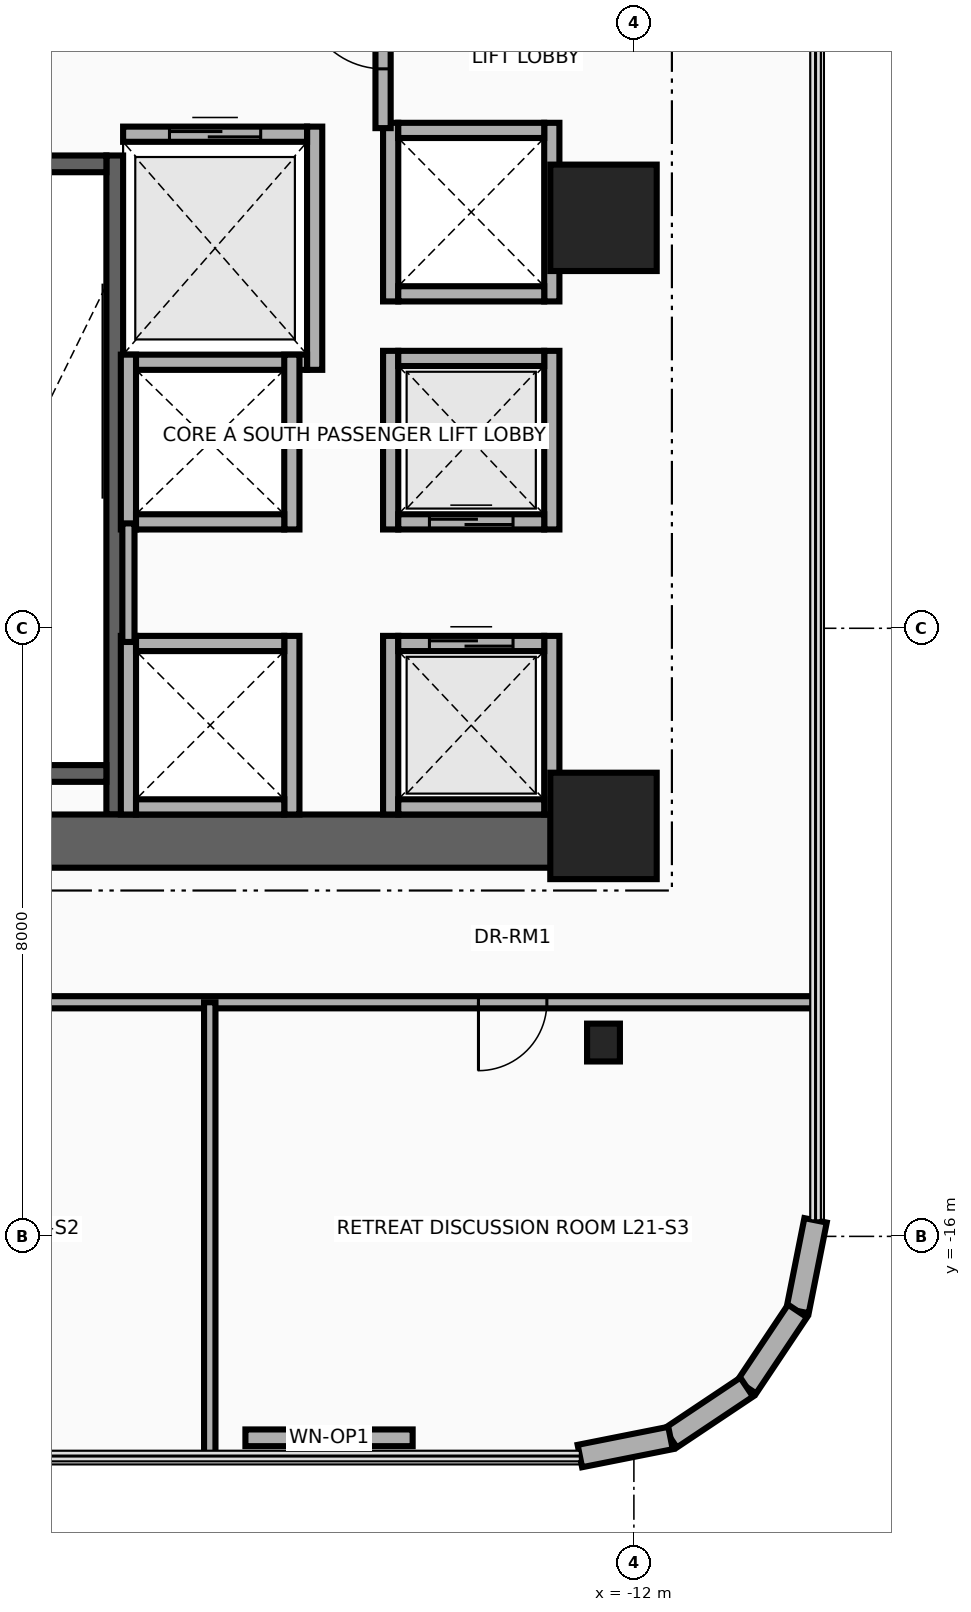
"""IFC4 building model, lengths in metres.
Left out: names, types, materials, properties, quantities, classifications, styles, units other than length and angle.
Written with IfcOpenShell. Run it as: python <this file> out.ifc"""

import sys

from ifc_helpers import new_model, si_unit, direction, frame, frame_2d, origin, origin_2d, place, context, subcontext, project, spatial, rectangle, i_section, extrude, source, transform, mapped, element, fill, save


model = new_model("IFC4")
c1 = context("Model", 3, precision=1e-05, world=origin(), true_north=direction((0.0, 1.0)))
c2 = subcontext(c1, "Body", "Model", "MODEL_VIEW")
j1 = project(units=[si_unit("LENGTHUNIT", "METRE"), si_unit("PLANEANGLEUNIT", "RADIAN")], contexts=[c1])
p1 = place(None, origin())
s1 = spatial("IfcSite", under=j1, at=p1, CompositionType="ELEMENT")
p2 = place(p1, origin())
s2 = spatial("IfcBuilding", under=s1, at=p2, CompositionType="ELEMENT")
p3 = place(p2, frame((0.0, 0.0, 85.2)))
s3 = spatial("IfcBuildingStorey", under=s2, at=p3, CompositionType="ELEMENT", Elevation=85.2)
p4 = place(p3, frame((-18.83, -10.45, 0.0), z_axis=(0.0, 0.0, 1.0), x_axis=(0.0, 1.0, 0.0)))
e1 = element("IfcWall", 1, at=p4, inside=s3, PredefinedType="SHEAR", context=c2, shape_type="SweptSolid", body=[
    extrude(rectangle(XDim=8.67, YDim=0.22, at=frame_2d((4.335, 0.0))), origin(), (0.0, 0.0, 1.0), 3.46),
])
p5 = place(p3, frame((-22.05, -9.91, 0.0), z_axis=(0.0, 0.0, 1.0), x_axis=(1.0, 0.0, 0.0)))
e2 = element("IfcWall", 2, at=p5, inside=s3, PredefinedType="SHEAR", context=c2, shape_type="SweptSolid", body=[
    extrude(rectangle(XDim=3.11, YDim=0.22, at=frame_2d((1.555, 0.0))), origin(), (0.0, 0.0, 1.0), 3.46),
])
p6 = place(p3, frame((-22.05, -1.89, 0.0), z_axis=(0.0, 0.0, 1.0), x_axis=(1.0, 0.0, 0.0)))
e3 = element("IfcWall", 3, at=p6, inside=s3, PredefinedType="SHEAR", context=c2, shape_type="SweptSolid", body=[
    extrude(rectangle(XDim=3.11, YDim=0.22, at=frame_2d((1.555, 0.0))), origin(), (0.0, 0.0, 1.0), 3.46),
])
p7 = place(p6, frame((1.0, 0.0, 0.0)))
e4 = element("IfcOpeningElement", 4, at=p7, cuts=e3, PredefinedType="OPENING", context=c2, shape_type="SweptSolid", body=[
    extrude(rectangle(XDim=1.1, YDim=2.15, at=frame_2d((0.55, 1.075))), frame((0.0, 0.125, 0.0), z_axis=(0.0, -1.0, 0.0), x_axis=(1.0, 0.0, 0.0)), (0.0, 0.0, 1.0), 0.25),
])
p8 = place(p3, frame((-22.65, -10.8, 0.0), z_axis=(0.0, 0.0, 1.0), x_axis=(1.0, 0.0, 0.0)))
e5 = element("IfcWall", 5, at=p8, inside=s3, PredefinedType="SHEAR", context=c2, shape_type="SweptSolid", body=[
    extrude(rectangle(XDim=10.25, YDim=0.7, at=frame_2d((5.125, 0.0))), origin(), (0.0, 0.0, 1.0), 3.46),
])
m1 = source(origin(), c2, "Body", "SweptSolid", [
    extrude(rectangle(XDim=1.4, YDim=1.4, at=origin_2d()), origin(), (0.0, 0.0, 1.0), 3.7),
])
for number, where, z_axis, x_axis in (
    (6, (-12.4, -10.6, 0.0), (0.0, 0.0, 1.0), (1.0, 0.0, 0.0)),
    (7, (-12.4, -2.6, 0.0), (0.0, 0.0, 1.0), (1.0, 0.0, 0.0)),
):
    element("IfcColumn", number, at=place(p3, frame(where, z_axis=z_axis, x_axis=x_axis)), inside=s3, PredefinedType="COLUMN", context=c2, shape_type="MappedRepresentation", body=[
        mapped(m1, transform((0.0, 0.0, 0.0), x_axis=(1.0, 0.0, 0.0), y_axis=(0.0, 1.0, 0.0), z_axis=(0.0, 0.0, 1.0), scale=1.0)),
    ])
m2 = source(origin(), c2, "Body", "SweptSolid", [
    extrude(i_section(OverallWidth=0.432, OverallDepth=0.498, WebThickness=0.056, FlangeThickness=0.089, at=origin_2d()), origin(), (0.0, 0.0, 1.0), 3.7),
])
p9 = place(p3, frame((-12.4, -13.45, 0.0), z_axis=(0.0, 0.0, 1.0), x_axis=(1.0, 0.0, 0.0)))
e8 = element("IfcColumn", 8, at=p9, inside=s3, PredefinedType="COLUMN", context=c2, shape_type="MappedRepresentation", body=[
    mapped(m2, transform((0.0, 0.0, 0.0), x_axis=(1.0, 0.0, 0.0), y_axis=(0.0, 1.0, 0.0), z_axis=(0.0, 0.0, 1.0), scale=1.0)),
])
p10 = place(p3, frame((-9.61, -15.789, 0.0), z_axis=(0.0, 0.0, 1.0), x_axis=(-0.194996050505, -0.980804027463, 0.0)))
e9 = element("IfcWall", 9, at=p10, inside=s3, PredefinedType="SOLIDWALL", context=c2, shape_type="SweptSolid", body=[
    extrude(rectangle(XDim=1.216, YDim=0.3, at=frame_2d((0.608, 0.0))), origin(), (0.0, 0.0, 1.0), 3.46),
])
for number, where, z_axis, x_axis in (
    (10, (-9.847, -16.982, 0.0), (0.0, 0.0, 1.0), (-0.556, -0.831, 0.0)),
    (11, (-10.517, -17.983, 0.0), (0.0, 0.0, 1.0), (-0.831, -0.556, 0.0)),
):
    element("IfcWall", number, at=place(p3, frame(where, z_axis=z_axis, x_axis=x_axis)), inside=s3, PredefinedType="SOLIDWALL", context=c2, shape_type="SweptSolid", body=[
        extrude(rectangle(XDim=1.205, YDim=0.3, at=frame_2d((0.603, 0.0))), origin(), (0.0, 0.0, 1.0), 3.46),
    ])
p11 = place(p3, frame((-11.518, -18.653, 0.0), z_axis=(0.0, 0.0, 1.0), x_axis=(-0.980804027463, -0.194996050505, 0.0)))
e12 = element("IfcWall", 12, at=p11, inside=s3, PredefinedType="SOLIDWALL", context=c2, shape_type="SweptSolid", body=[
    extrude(rectangle(XDim=1.216, YDim=0.3, at=frame_2d((0.608, 0.0))), origin(), (0.0, 0.0, 1.0), 3.46),
])
p12 = place(p3, frame((-14.911, -18.65, 0.0), z_axis=(0.0, 0.0, 1.0), x_axis=(-1.0, 0.0, 0.0)))
e13 = element("IfcWall", 13, at=p12, inside=s3, PredefinedType="SOLIDWALL", context=c2, shape_type="SweptSolid", body=[
    extrude(rectangle(XDim=2.2, YDim=0.22, at=frame_2d((1.1, 0.0))), origin(), (0.0, 0.0, 1.0), 3.46),
])
p13 = place(p12, frame((0.65, 0.0, 0.95)))
e14 = element("IfcOpeningElement", 14, at=p13, cuts=e13, PredefinedType="OPENING", context=c2, shape_type="SweptSolid", body=[
    extrude(rectangle(XDim=0.9, YDim=1.3, at=frame_2d((0.45, 0.65))), frame((0.0, 0.125, 0.0), z_axis=(0.0, -1.0, 0.0), x_axis=(1.0, 0.0, 0.0)), (0.0, 0.0, 1.0), 0.25),
])
p14 = place(p3, frame((-16.2, -4.6, 0.0), z_axis=(0.0, 0.0, 1.0), x_axis=(0.0, 1.0, 0.0)))
e15 = element("IfcWall", 15, at=p14, inside=s3, PredefinedType="MOVABLE", context=c2, shape_type="SweptSolid", body=[
    extrude(rectangle(XDim=3.2, YDim=0.2, at=frame_2d((1.6, 0.0))), origin(), (0.0, 0.0, 1.0), 3.46),
])
p15 = place(p3, frame((-18.72, -4.5, 0.0), z_axis=(0.0, 0.0, 1.0), x_axis=(1.0, 0.0, 0.0)))
e16 = element("IfcWall", 16, at=p15, inside=s3, PredefinedType="MOVABLE", context=c2, shape_type="SweptSolid", body=[
    extrude(rectangle(XDim=2.42, YDim=0.2, at=frame_2d((1.21, 0.0))), origin(), (0.0, 0.0, 1.0), 3.46),
])
p16 = place(p3, frame((-18.72, -1.5, 0.0), z_axis=(0.0, 0.0, 1.0), x_axis=(1.0, 0.0, 0.0)))
e17 = element("IfcWall", 17, at=p16, inside=s3, PredefinedType="MOVABLE", context=c2, shape_type="SweptSolid", body=[
    extrude(rectangle(XDim=2.42, YDim=0.2, at=frame_2d((1.21, 0.0))), origin(), (0.0, 0.0, 1.0), 3.46),
])
p17 = place(p16, frame((0.61, 0.0, 0.0)))
e18 = element("IfcOpeningElement", 18, at=p17, cuts=e17, PredefinedType="OPENING", context=c2, shape_type="SweptSolid", body=[
    extrude(rectangle(XDim=1.2, YDim=2.1, at=frame_2d((0.6, 1.05))), frame((0.0, 0.115, 0.0), z_axis=(0.0, -1.0, 0.0), x_axis=(1.0, 0.0, 0.0)), (0.0, 0.0, 1.0), 0.23),
])
for number, where, z_axis, x_axis in (
    (19, (-15.2, -10.45, 0.0), (0.0, 0.0, 1.0), (0.0, 1.0, 0.0)),
    (20, (-13.08, -10.45, 0.0), (0.0, 0.0, 1.0), (0.0, 1.0, 0.0)),
):
    element("IfcWall", number, at=place(p3, frame(where, z_axis=z_axis, x_axis=x_axis)), inside=s3, PredefinedType="MOVABLE", context=c2, shape_type="SweptSolid", body=[
        extrude(rectangle(XDim=2.35, YDim=0.2, at=frame_2d((1.175, 0.0))), origin(), (0.0, 0.0, 1.0), 2.583),
    ])
p18 = place(p3, frame((-15.1, -10.35, 0.0), z_axis=(0.0, 0.0, 1.0), x_axis=(1.0, 0.0, 0.0)))
e21 = element("IfcWall", 21, at=p18, inside=s3, PredefinedType="MOVABLE", context=c2, shape_type="SweptSolid", body=[
    extrude(rectangle(XDim=1.92, YDim=0.2, at=frame_2d((0.96, 0.0))), origin(), (0.0, 0.0, 1.0), 2.583),
])
p19 = place(p3, frame((-15.1, -8.2, 0.0), z_axis=(0.0, 0.0, 1.0), x_axis=(1.0, 0.0, 0.0)))
e22 = element("IfcWall", 22, at=p19, inside=s3, PredefinedType="MOVABLE", context=c2, shape_type="SweptSolid", body=[
    extrude(rectangle(XDim=1.92, YDim=0.2, at=frame_2d((0.96, 0.0))), origin(), (0.0, 0.0, 1.0), 3.46),
])
p20 = place(p19, frame((0.41, 0.0, 0.0)))
e23 = element("IfcOpeningElement", 23, at=p20, cuts=e22, PredefinedType="OPENING", context=c2, shape_type="SweptSolid", body=[
    extrude(rectangle(XDim=1.1, YDim=2.1, at=frame_2d((0.55, 1.05))), frame((0.0, 0.115, 0.0), z_axis=(0.0, -1.0, 0.0), x_axis=(1.0, 0.0, 0.0)), (0.0, 0.0, 1.0), 0.23),
])
for number, where, z_axis, x_axis in (
    (24, (-15.2, -6.7, 0.0), (0.0, 0.0, 1.0), (0.0, 1.0, 0.0)),
    (25, (-13.08, -6.7, 0.0), (0.0, 0.0, 1.0), (0.0, 1.0, 0.0)),
):
    element("IfcWall", number, at=place(p3, frame(where, z_axis=z_axis, x_axis=x_axis)), inside=s3, PredefinedType="MOVABLE", context=c2, shape_type="SweptSolid", body=[
        extrude(rectangle(XDim=2.35, YDim=0.2, at=frame_2d((1.175, 0.0))), origin(), (0.0, 0.0, 1.0), 3.46),
    ])
p21 = place(p3, frame((-15.1, -6.6, 0.0), z_axis=(0.0, 0.0, 1.0), x_axis=(1.0, 0.0, 0.0)))
e26 = element("IfcWall", 26, at=p21, inside=s3, PredefinedType="MOVABLE", context=c2, shape_type="SweptSolid", body=[
    extrude(rectangle(XDim=1.92, YDim=0.2, at=frame_2d((0.96, 0.0))), origin(), (0.0, 0.0, 1.0), 3.46),
])
p22 = place(p21, frame((0.41, 0.0, 0.0)))
e27 = element("IfcOpeningElement", 27, at=p22, cuts=e26, PredefinedType="OPENING", context=c2, shape_type="SweptSolid", body=[
    extrude(rectangle(XDim=1.1, YDim=2.1, at=frame_2d((0.55, 1.05))), frame((0.0, 0.115, 0.0), z_axis=(0.0, -1.0, 0.0), x_axis=(1.0, 0.0, 0.0)), (0.0, 0.0, 1.0), 0.23),
])
p23 = place(p3, frame((-15.1, -4.45, 0.0), z_axis=(0.0, 0.0, 1.0), x_axis=(1.0, 0.0, 0.0)))
e28 = element("IfcWall", 28, at=p23, inside=s3, PredefinedType="MOVABLE", context=c2, shape_type="SweptSolid", body=[
    extrude(rectangle(XDim=1.92, YDim=0.2, at=frame_2d((0.96, 0.0))), origin(), (0.0, 0.0, 1.0), 3.46),
])
for number, where, z_axis, x_axis in (
    (29, (-18.65, -10.45, 0.0), (0.0, 0.0, 1.0), (0.0, 1.0, 0.0)),
    (30, (-16.5, -10.45, 0.0), (0.0, 0.0, 1.0), (0.0, 1.0, 0.0)),
):
    element("IfcWall", number, at=place(p3, frame(where, z_axis=z_axis, x_axis=x_axis)), inside=s3, PredefinedType="MOVABLE", context=c2, shape_type="SweptSolid", body=[
        extrude(rectangle(XDim=2.35, YDim=0.2, at=frame_2d((1.175, 0.0))), origin(), (0.0, 0.0, 1.0), 2.583),
    ])
p24 = place(p3, frame((-18.55, -10.35, 0.0), z_axis=(0.0, 0.0, 1.0), x_axis=(1.0, 0.0, 0.0)))
e31 = element("IfcWall", 31, at=p24, inside=s3, PredefinedType="MOVABLE", context=c2, shape_type="SweptSolid", body=[
    extrude(rectangle(XDim=1.95, YDim=0.2, at=frame_2d((0.975, 0.0))), origin(), (0.0, 0.0, 1.0), 2.583),
])
p25 = place(p3, frame((-18.55, -8.2, 0.0), z_axis=(0.0, 0.0, 1.0), x_axis=(1.0, 0.0, 0.0)))
e32 = element("IfcWall", 32, at=p25, inside=s3, PredefinedType="MOVABLE", context=c2, shape_type="SweptSolid", body=[
    extrude(rectangle(XDim=1.95, YDim=0.2, at=frame_2d((0.975, 0.0))), origin(), (0.0, 0.0, 1.0), 3.46),
])
for number, where, z_axis, x_axis in (
    (33, (-18.65, -6.7, 0.0), (0.0, 0.0, 1.0), (0.0, 1.0, 0.0)),
    (34, (-16.5, -6.7, 0.0), (0.0, 0.0, 1.0), (0.0, 1.0, 0.0)),
):
    element("IfcWall", number, at=place(p3, frame(where, z_axis=z_axis, x_axis=x_axis)), inside=s3, PredefinedType="MOVABLE", context=c2, shape_type="SweptSolid", body=[
        extrude(rectangle(XDim=2.3, YDim=0.2, at=frame_2d((1.15, 0.0))), origin(), (0.0, 0.0, 1.0), 3.46),
    ])
p26 = place(p3, frame((-18.55, -6.6, 0.0), z_axis=(0.0, 0.0, 1.0), x_axis=(1.0, 0.0, 0.0)))
e35 = element("IfcWall", 35, at=p26, inside=s3, PredefinedType="MOVABLE", context=c2, shape_type="SweptSolid", body=[
    extrude(rectangle(XDim=1.95, YDim=0.2, at=frame_2d((0.975, 0.0))), origin(), (0.0, 0.0, 1.0), 3.46),
])
for number, where, z_axis, x_axis in (
    (36, (-15.2, -3.7, 0.0), (0.0, 0.0, 1.0), (0.0, 1.0, 0.0)),
    (37, (-13.08, -3.7, 0.0), (0.0, 0.0, 1.0), (0.0, 1.0, 0.0)),
):
    element("IfcWall", number, at=place(p3, frame(where, z_axis=z_axis, x_axis=x_axis)), inside=s3, PredefinedType="MOVABLE", context=c2, shape_type="SweptSolid", body=[
        extrude(rectangle(XDim=2.35, YDim=0.2, at=frame_2d((1.175, 0.0))), origin(), (0.0, 0.0, 1.0), 3.46),
    ])
for number, where, z_axis, x_axis in (
    (38, (-15.1, -3.6, 0.0), (0.0, 0.0, 1.0), (1.0, 0.0, 0.0)),
    (39, (-15.1, -1.45, 0.0), (0.0, 0.0, 1.0), (1.0, 0.0, 0.0)),
):
    element("IfcWall", number, at=place(p3, frame(where, z_axis=z_axis, x_axis=x_axis)), inside=s3, PredefinedType="MOVABLE", context=c2, shape_type="SweptSolid", body=[
        extrude(rectangle(XDim=1.92, YDim=0.2, at=frame_2d((0.96, 0.0))), origin(), (0.0, 0.0, 1.0), 3.46),
    ])
p27 = place(p3, frame((-15.3, -1.42, 0.0), z_axis=(0.0, 0.0, 1.0), x_axis=(0.0, 1.0, 0.0)))
e40 = element("IfcWall", 40, at=p27, inside=s3, PredefinedType="PARTITIONING", context=c2, shape_type="SweptSolid", body=[
    extrude(rectangle(XDim=2.67, YDim=0.2, at=frame_2d((1.335, 0.0))), origin(), (0.0, 0.0, 1.0), 3.46),
])
p28 = place(p27, frame((0.78, 0.0, 0.0)))
e41 = element("IfcOpeningElement", 41, at=p28, cuts=e40, PredefinedType="OPENING", context=c2, shape_type="SweptSolid", body=[
    extrude(rectangle(XDim=1.05, YDim=2.15, at=frame_2d((0.525, 1.075))), frame((0.0, 0.115, 0.0), z_axis=(0.0, -1.0, 0.0), x_axis=(1.0, 0.0, 0.0)), (0.0, 0.0, 1.0), 0.23),
])
p29 = place(p3, frame((-18.65, -8.18, 0.0), z_axis=(0.0, 0.0, 1.0), x_axis=(0.0, 1.0, 0.0)))
e42 = element("IfcWall", 42, at=p29, inside=s3, PredefinedType="PARTITIONING", context=c2, shape_type="SweptSolid", body=[
    extrude(rectangle(XDim=1.56, YDim=0.16, at=frame_2d((0.78, 0.0))), origin(), (0.0, 0.0, 1.0), 3.46),
])
p30 = place(p3, frame((-31.89, -12.92, 0.0), z_axis=(0.0, 0.0, 1.0), x_axis=(1.0, 0.0, 0.0)))
e43 = element("IfcWall", 43, at=p30, inside=s3, PredefinedType="PARTITIONING", context=c2, shape_type="SweptSolid", body=[
    extrude(rectangle(XDim=22.28, YDim=0.16, at=frame_2d((11.14, 0.0))), origin(), (0.0, 0.0, 1.0), 2.834),
])
p31 = place(p30, frame((2.665, 0.0, 0.0)))
e44 = element("IfcOpeningElement", 44, at=p31, cuts=e43, PredefinedType="OPENING", context=c2, shape_type="SweptSolid", body=[
    extrude(rectangle(XDim=0.9, YDim=2.1, at=frame_2d((0.45, 1.05))), frame((0.0, 0.095, 0.0), z_axis=(0.0, -1.0, 0.0), x_axis=(1.0, 0.0, 0.0)), (0.0, 0.0, 1.0), 0.19),
])
p32 = place(p30, frame((9.82, 0.0, 0.0)))
e45 = element("IfcOpeningElement", 45, at=p32, cuts=e43, PredefinedType="OPENING", context=c2, shape_type="SweptSolid", body=[
    extrude(rectangle(XDim=0.9, YDim=2.1, at=frame_2d((0.45, 1.05))), frame((0.0, 0.095, 0.0), z_axis=(0.0, -1.0, 0.0), x_axis=(1.0, 0.0, 0.0)), (0.0, 0.0, 1.0), 0.19),
])
p33 = place(p30, frame((17.845, 0.0, 0.0)))
e46 = element("IfcOpeningElement", 46, at=p33, cuts=e43, PredefinedType="OPENING", context=c2, shape_type="SweptSolid", body=[
    extrude(rectangle(XDim=0.9, YDim=2.1, at=frame_2d((0.45, 1.05))), frame((0.0, 0.095, 0.0), z_axis=(0.0, -1.0, 0.0), x_axis=(1.0, 0.0, 0.0)), (0.0, 0.0, 1.0), 0.19),
])
p34 = place(p3, frame((-17.58, -18.89, 0.0), z_axis=(0.0, 0.0, 1.0), x_axis=(0.0, 1.0, 0.0)))
e47 = element("IfcWall", 47, at=p34, inside=s3, PredefinedType="PARTITIONING", context=c2, shape_type="SweptSolid", body=[
    extrude(rectangle(XDim=5.97, YDim=0.15, at=frame_2d((2.985, 0.0))), origin(), (0.0, 0.0, 1.0), 2.896),
])
p35 = place(p13, origin())
e48 = element("IfcWindow", 48, at=p35, inside=s3, PartitioningType="SINGLE_PANEL", PredefinedType="WINDOW", context=c2, shape_type="SweptSolid", body=[
    extrude(rectangle(XDim=0.9, YDim=1.3, at=frame_2d((0.45, 0.65))), frame((0.0, 0.03, 0.0), z_axis=(0.0, -1.0, 0.0), x_axis=(1.0, 0.0, 0.0)), (0.0, 0.0, 1.0), 0.06),
])
fill(e14, e48)
p36 = place(p17, origin())
e49 = element("IfcDoor", 49, at=p36, inside=s3, OperationType="DOUBLE_DOOR_SLIDING", PredefinedType="DOOR", context=c2, shape_type="SweptSolid", body=[
    extrude(rectangle(XDim=1.2, YDim=2.1, at=frame_2d((0.6, 1.05))), frame((0.0, 0.025, 0.0), z_axis=(0.0, -1.0, 0.0), x_axis=(1.0, 0.0, 0.0)), (0.0, 0.0, 1.0), 0.05),
])
fill(e18, e49)
p37 = place(p20, origin())
e50 = element("IfcDoor", 50, at=p37, inside=s3, OperationType="DOUBLE_DOOR_SLIDING", PredefinedType="DOOR", context=c2, shape_type="SweptSolid", body=[
    extrude(rectangle(XDim=1.1, YDim=2.1, at=frame_2d((0.55, 1.05))), frame((0.0, 0.025, 0.0), z_axis=(0.0, -1.0, 0.0), x_axis=(1.0, 0.0, 0.0)), (0.0, 0.0, 1.0), 0.05),
])
fill(e23, e50)
p38 = place(p22, origin())
e51 = element("IfcDoor", 51, at=p38, inside=s3, OperationType="DOUBLE_DOOR_SLIDING", PredefinedType="DOOR", context=c2, shape_type="SweptSolid", body=[
    extrude(rectangle(XDim=1.1, YDim=2.1, at=frame_2d((0.55, 1.05))), frame((0.0, 0.025, 0.0), z_axis=(0.0, -1.0, 0.0), x_axis=(1.0, 0.0, 0.0)), (0.0, 0.0, 1.0), 0.05),
])
fill(e27, e51)
p39 = place(p28, origin())
e52 = element("IfcDoor", 52, at=p39, inside=s3, OperationType="SINGLE_SWING_RIGHT", PredefinedType="DOOR", context=c2, shape_type="SweptSolid", body=[
    extrude(rectangle(XDim=1.05, YDim=2.15, at=frame_2d((0.525, 1.075))), frame((0.0, 0.025, 0.0), z_axis=(0.0, -1.0, 0.0), x_axis=(1.0, 0.0, 0.0)), (0.0, 0.0, 1.0), 0.05),
])
fill(e41, e52)
p40 = place(p33, frame((0.9, 0.0, 0.0), z_axis=(0.0, 0.0, 1.0), x_axis=(-1.0, 0.0, 0.0)))
e53 = element("IfcDoor", 53, at=p40, inside=s3, OperationType="SINGLE_SWING_LEFT", PredefinedType="DOOR", context=c2, shape_type="SweptSolid", body=[
    extrude(rectangle(XDim=0.9, YDim=2.1, at=frame_2d((0.45, 1.05))), frame((0.0, 0.025, 0.0), z_axis=(0.0, -1.0, 0.0), x_axis=(1.0, 0.0, 0.0)), (0.0, 0.0, 1.0), 0.05),
])
fill(e46, e53)
save(model, sys.argv[1])
